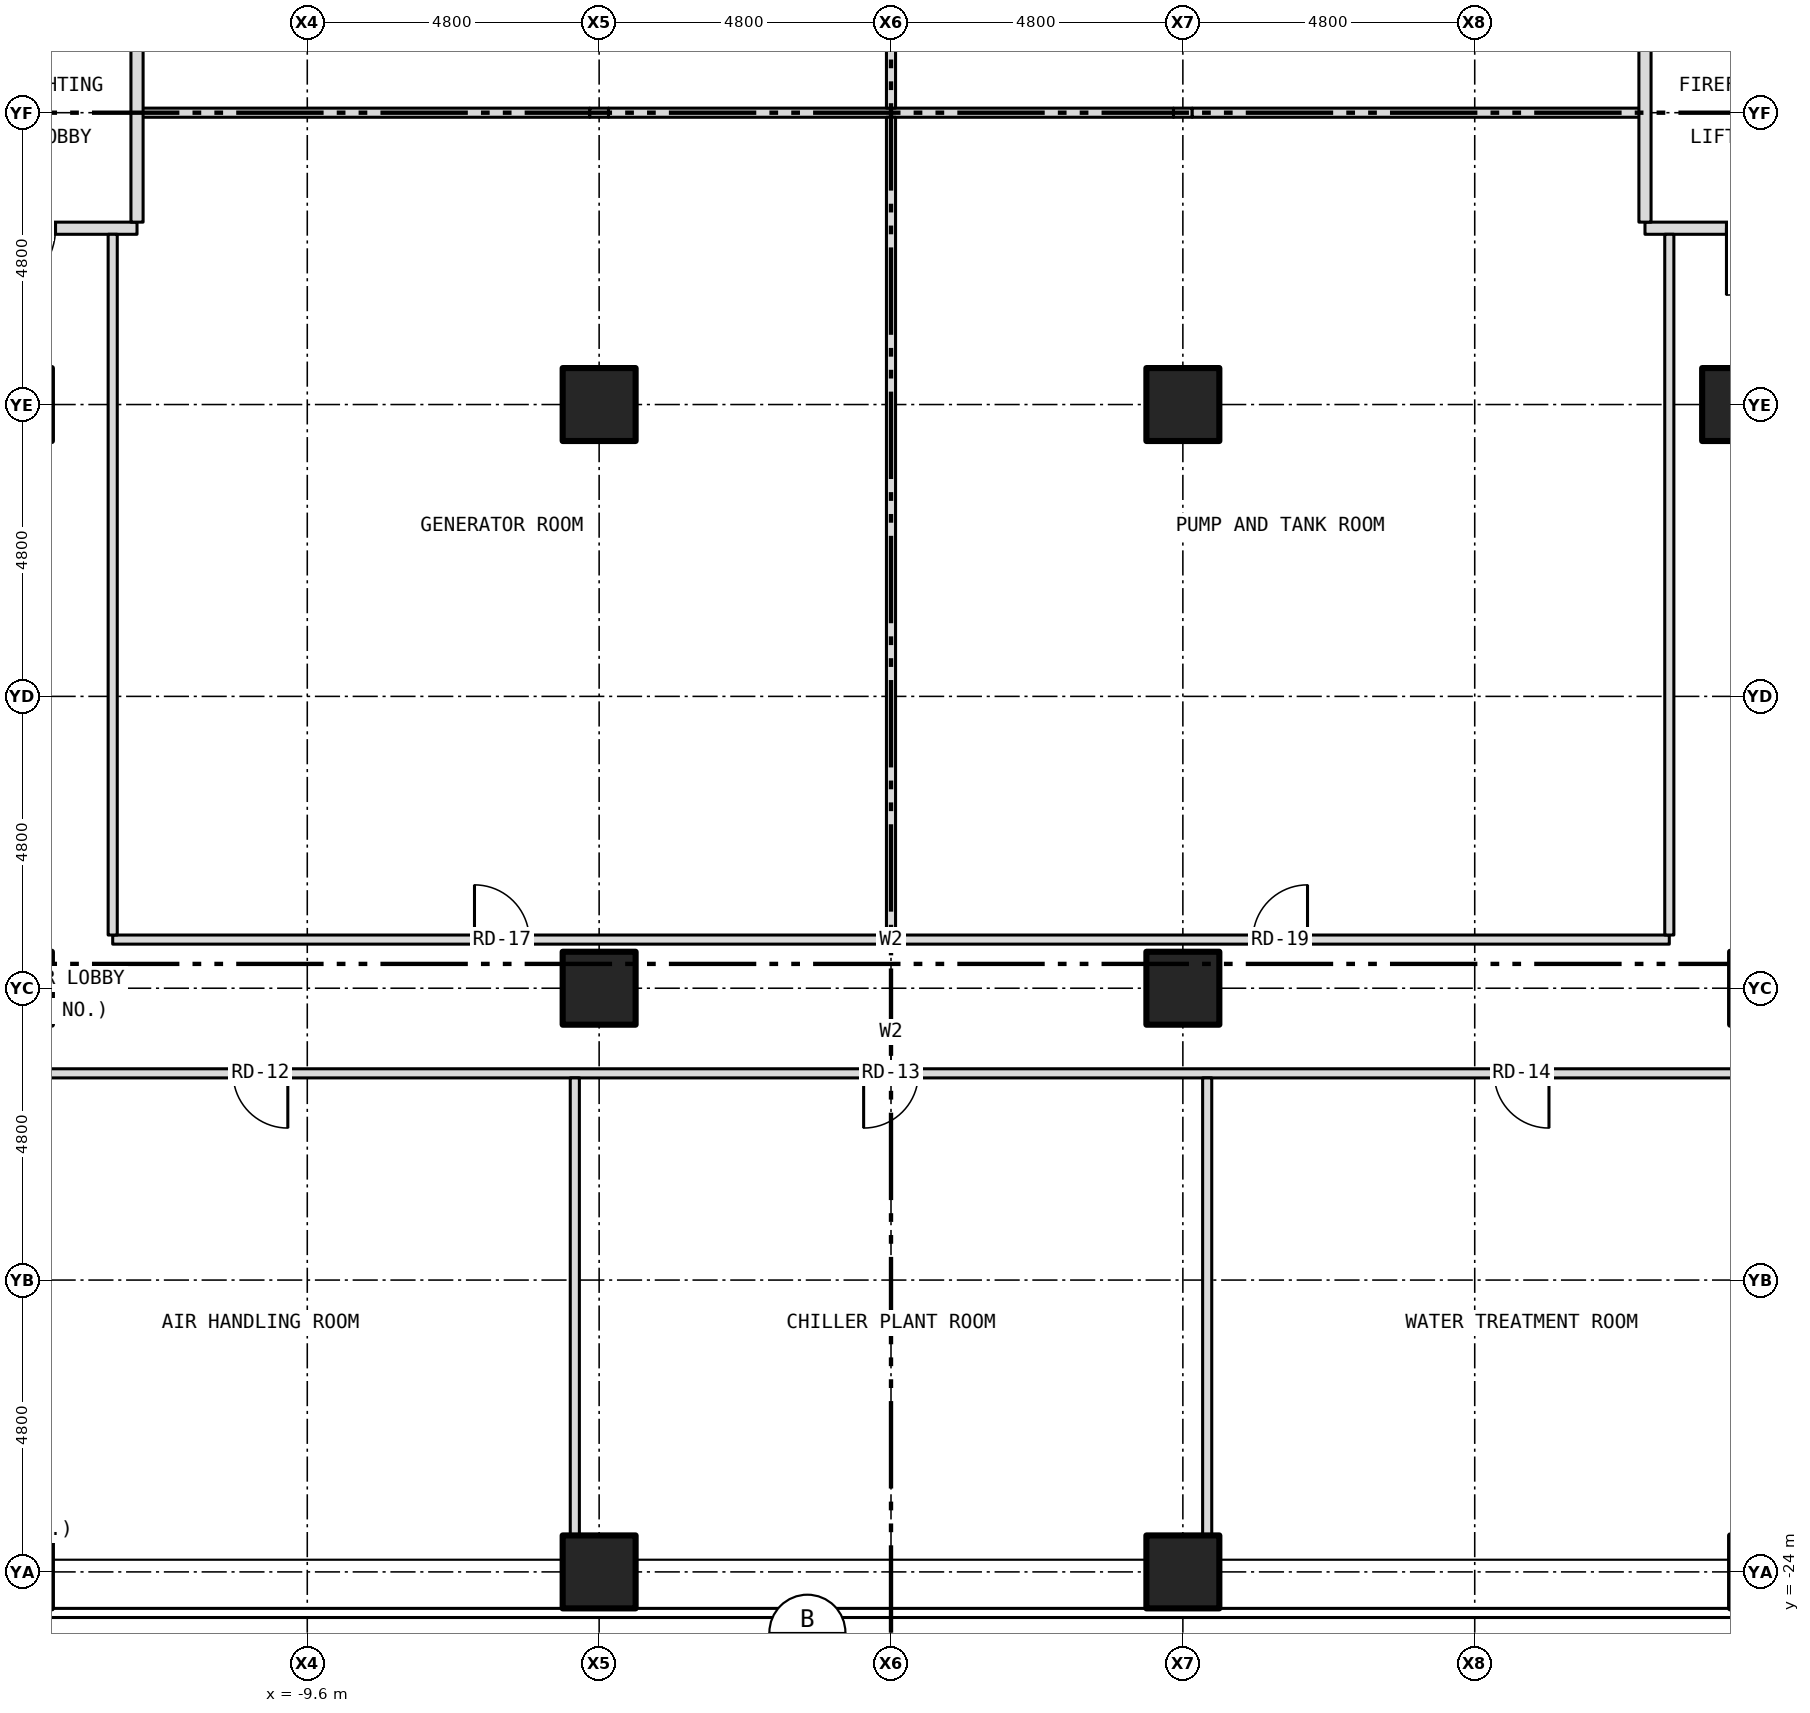
"""IFC4 building model, lengths in metres.
Left out: names, types, materials, properties, quantities, classifications, styles, units other than length and angle.
Written with IfcOpenShell. Run it as: python <this file> out.ifc"""

import sys

from ifc_helpers import new_model, si_unit, direction, frame, frame_2d, origin, origin_2d, place, context, subcontext, project, spatial, rectangle, hollow_rectangle, extrude, element, fill, save


model = new_model("IFC4")
c1 = context("Model", 3, precision=1e-05, world=origin(), true_north=direction((0.0, 1.0)))
c2 = subcontext(c1, "Body", "Model", "MODEL_VIEW")
j1 = project(units=[si_unit("LENGTHUNIT", "METRE"), si_unit("PLANEANGLEUNIT", "RADIAN")], contexts=[c1])
p1 = place(None, origin())
s1 = spatial("IfcSite", under=j1, at=p1, CompositionType="ELEMENT")
p2 = place(p1, origin())
s2 = spatial("IfcBuilding", under=s1, at=p2, CompositionType="ELEMENT")
p3 = place(p2, frame((0.0, 0.0, 33.5)))
s3 = spatial("IfcBuildingStorey", under=s2, at=p3, CompositionType="ELEMENT", Elevation=33.5)
for number, where, z_axis, x_axis in (
    (1, (-14.4, -24.0, -0.3), (0.0, 0.0, 1.0), (1.0, 0.0, 0.0)),
    (2, (-4.8, -24.0, -0.3), (0.0, 0.0, 1.0), (1.0, 0.0, 0.0)),
    (3, (4.8, -24.0, -0.3), (0.0, 0.0, 1.0), (1.0, 0.0, 0.0)),
    (4, (14.4, -24.0, -0.3), (0.0, 0.0, 1.0), (1.0, 0.0, 0.0)),
    (5, (-14.4, -14.4, -0.3), (0.0, 0.0, 1.0), (1.0, 0.0, 0.0)),
    (6, (-14.4, -4.8, -0.3), (0.0, 0.0, 1.0), (1.0, 0.0, 0.0)),
    (7, (-4.8, -14.4, -0.3), (0.0, 0.0, 1.0), (1.0, 0.0, 0.0)),
    (8, (-4.8, -4.8, -0.3), (0.0, 0.0, 1.0), (1.0, 0.0, 0.0)),
    (9, (4.8, -14.4, -0.3), (0.0, 0.0, 1.0), (1.0, 0.0, 0.0)),
    (10, (4.8, -4.8, -0.3), (0.0, 0.0, 1.0), (1.0, 0.0, 0.0)),
    (11, (14.4, -14.4, -0.3), (0.0, 0.0, 1.0), (1.0, 0.0, 0.0)),
    (12, (13.94, -4.8, -0.3), (0.0, 0.0, 1.0), (1.0, 0.0, 0.0)),
):
    element("IfcColumn", number, at=place(p3, frame(where, z_axis=z_axis, x_axis=x_axis)), inside=s3, PredefinedType="COLUMN", context=c2, shape_type="SweptSolid", body=[
        extrude(hollow_rectangle(XDim=1.2, YDim=1.2, WallThickness=0.07, at=origin_2d()), origin(), (0.0, 0.0, 1.0), 5.65),
    ])
p4 = place(p3, frame((-15.8, -15.8, 0.0), z_axis=(0.0, 0.0, 1.0), x_axis=(1.0, 0.0, 0.0)))
e13 = element("IfcWall", 13, at=p4, inside=s3, PredefinedType="PARTITIONING", context=c2, shape_type="SweptSolid", body=[
    extrude(rectangle(XDim=31.6, YDim=0.15, at=frame_2d((15.8, 0.0))), origin(), (0.0, 0.0, 1.0), 5.35),
])
p5 = place(p4, frame((4.98, 0.0, 0.0)))
e14 = element("IfcOpeningElement", 14, at=p5, cuts=e13, PredefinedType="OPENING", context=c2, shape_type="SweptSolid", body=[
    extrude(rectangle(XDim=0.9, YDim=2.1, at=frame_2d((0.45, 1.05))), frame((0.0, 0.087, 0.0), z_axis=(0.0, -1.0, 0.0), x_axis=(1.0, 0.0, 0.0)), (0.0, 0.0, 1.0), 0.174),
])
p6 = place(p4, frame((15.35, 0.0, 0.0)))
e15 = element("IfcOpeningElement", 15, at=p6, cuts=e13, PredefinedType="OPENING", context=c2, shape_type="SweptSolid", body=[
    extrude(rectangle(XDim=0.9, YDim=2.1, at=frame_2d((0.45, 1.05))), frame((0.0, 0.087, 0.0), z_axis=(0.0, -1.0, 0.0), x_axis=(1.0, 0.0, 0.0)), (0.0, 0.0, 1.0), 0.174),
])
p7 = place(p4, frame((25.721, 0.0, 0.0)))
e16 = element("IfcOpeningElement", 16, at=p7, cuts=e13, PredefinedType="OPENING", context=c2, shape_type="SweptSolid", body=[
    extrude(rectangle(XDim=0.9, YDim=2.1, at=frame_2d((0.45, 1.05))), frame((0.0, 0.087, 0.0), z_axis=(0.0, -1.0, 0.0), x_axis=(1.0, 0.0, 0.0)), (0.0, 0.0, 1.0), 0.174),
])
p8 = place(p3, frame((-12.8, -13.6, 0.0), z_axis=(0.0, 0.0, 1.0), x_axis=(1.0, 0.0, 0.0)))
e17 = element("IfcWall", 17, at=p8, inside=s3, PredefinedType="PARTITIONING", context=c2, shape_type="SweptSolid", body=[
    extrude(rectangle(XDim=25.6, YDim=0.15, at=frame_2d((12.8, 0.0))), origin(), (0.0, 0.0, 1.0), 5.35),
])
p9 = place(p8, frame((5.95, 0.0, 0.0)))
e18 = element("IfcOpeningElement", 18, at=p9, cuts=e17, PredefinedType="OPENING", context=c2, shape_type="SweptSolid", body=[
    extrude(rectangle(XDim=0.9, YDim=2.1, at=frame_2d((0.45, 1.05))), frame((0.0, 0.087, 0.0), z_axis=(0.0, -1.0, 0.0), x_axis=(1.0, 0.0, 0.0)), (0.0, 0.0, 1.0), 0.174),
])
p10 = place(p8, frame((18.75, 0.0, 0.0)))
e19 = element("IfcOpeningElement", 19, at=p10, cuts=e17, PredefinedType="OPENING", context=c2, shape_type="SweptSolid", body=[
    extrude(rectangle(XDim=0.9, YDim=2.1, at=frame_2d((0.45, 1.05))), frame((0.0, 0.087, 0.0), z_axis=(0.0, -1.0, 0.0), x_axis=(1.0, 0.0, 0.0)), (0.0, 0.0, 1.0), 0.174),
])
p11 = place(p3, frame((-15.68, -1.9, 0.0), z_axis=(0.0, 0.0, 1.0), x_axis=(1.0, 0.0, 0.0)))
e20 = element("IfcWall", 20, at=p11, inside=s3, PredefinedType="PARTITIONING", context=c2, shape_type="SweptSolid", body=[
    extrude(rectangle(XDim=3.28, YDim=0.2, at=frame_2d((1.64, 0.0))), origin(), (0.0, 0.0, 1.0), 5.35),
])
p12 = place(p11, frame((0.84, 0.0, 0.0)))
e21 = element("IfcOpeningElement", 21, at=p12, cuts=e20, PredefinedType="OPENING", context=c2, shape_type="SweptSolid", body=[
    extrude(rectangle(XDim=1.1, YDim=2.1, at=frame_2d((0.55, 1.05))), frame((0.0, 0.112, 0.0), z_axis=(0.0, -1.0, 0.0), x_axis=(1.0, 0.0, 0.0)), (0.0, 0.0, 1.0), 0.224),
])
p13 = place(p3, frame((12.4, -1.9, 0.0), z_axis=(0.0, 0.0, 1.0), x_axis=(1.0, 0.0, 0.0)))
e22 = element("IfcWall", 22, at=p13, inside=s3, PredefinedType="PARTITIONING", context=c2, shape_type="SweptSolid", body=[
    extrude(rectangle(XDim=3.28, YDim=0.2, at=frame_2d((1.64, 0.0))), origin(), (0.0, 0.0, 1.0), 5.35),
])
p14 = place(p13, frame((1.34, 0.0, 0.0)))
e23 = element("IfcOpeningElement", 23, at=p14, cuts=e22, PredefinedType="OPENING", context=c2, shape_type="SweptSolid", body=[
    extrude(rectangle(XDim=1.1, YDim=2.1, at=frame_2d((0.55, 1.05))), frame((0.0, 0.112, 0.0), z_axis=(0.0, -1.0, 0.0), x_axis=(1.0, 0.0, 0.0)), (0.0, 0.0, 1.0), 0.224),
])
p15 = place(p3, frame((-12.4, 0.0, 0.0), z_axis=(0.0, 0.0, 1.0), x_axis=(1.0, 0.0, 0.0)))
e24 = element("IfcWall", 24, at=p15, inside=s3, PredefinedType="PARTITIONING", context=c2, shape_type="SweptSolid", body=[
    extrude(rectangle(XDim=7.446, YDim=0.15, at=frame_2d((3.723, 0.0))), origin(), (0.0, 0.0, 1.0), 4.359),
])
p16 = place(p3, frame((-4.954, 0.0, 0.0), z_axis=(0.0, 0.0, 1.0), x_axis=(1.0, 0.0, 0.0)))
e25 = element("IfcWall", 25, at=p16, inside=s3, PredefinedType="PARTITIONING", context=c2, shape_type="SweptSolid", body=[
    extrude(rectangle(XDim=0.308, YDim=0.15, at=frame_2d((0.154, 0.0))), origin(), (0.0, 0.0, 1.0), 5.35),
])
p17 = place(p3, frame((-4.646, 0.0, 0.0), z_axis=(0.0, 0.0, 1.0), x_axis=(1.0, 0.0, 0.0)))
e26 = element("IfcWall", 26, at=p17, inside=s3, PredefinedType="PARTITIONING", context=c2, shape_type="SweptSolid", body=[
    extrude(rectangle(XDim=9.292, YDim=0.15, at=frame_2d((4.646, 0.0))), origin(), (0.0, 0.0, 1.0), 4.359),
])
p18 = place(p3, frame((4.646, 0.0, 0.0), z_axis=(0.0, 0.0, 1.0), x_axis=(1.0, 0.0, 0.0)))
e27 = element("IfcWall", 27, at=p18, inside=s3, PredefinedType="PARTITIONING", context=c2, shape_type="SweptSolid", body=[
    extrude(rectangle(XDim=0.308, YDim=0.15, at=frame_2d((0.154, 0.0))), origin(), (0.0, 0.0, 1.0), 5.35),
])
p19 = place(p3, frame((4.954, 0.0, 0.0), z_axis=(0.0, 0.0, 1.0), x_axis=(1.0, 0.0, 0.0)))
e28 = element("IfcWall", 28, at=p19, inside=s3, PredefinedType="PARTITIONING", context=c2, shape_type="SweptSolid", body=[
    extrude(rectangle(XDim=7.446, YDim=0.15, at=frame_2d((3.723, 0.0))), origin(), (0.0, 0.0, 1.0), 4.359),
])
p20 = place(p3, frame((-12.8, -13.525, 0.0), z_axis=(0.0, 0.0, 1.0), x_axis=(0.0, 1.0, 0.0)))
e29 = element("IfcWall", 29, at=p20, inside=s3, PredefinedType="PARTITIONING", context=c2, shape_type="SweptSolid", body=[
    extrude(rectangle(XDim=11.525, YDim=0.15, at=frame_2d((5.762, 0.0))), origin(), (0.0, 0.0, 1.0), 5.35),
])
p21 = place(p3, frame((-12.4, -1.8, 0.0), z_axis=(0.0, 0.0, 1.0), x_axis=(0.0, 1.0, 0.0)))
e30 = element("IfcWall", 30, at=p21, inside=s3, PredefinedType="PARTITIONING", context=c2, shape_type="SweptSolid", body=[
    extrude(rectangle(XDim=4.0, YDim=0.2, at=frame_2d((2.0, 0.0))), origin(), (0.0, 0.0, 1.0), 5.35),
])
p22 = place(p3, frame((-5.2, -23.88, 0.0), z_axis=(0.0, 0.0, 1.0), x_axis=(0.0, 1.0, 0.0)))
e31 = element("IfcWall", 31, at=p22, inside=s3, PredefinedType="PARTITIONING", context=c2, shape_type="SweptSolid", body=[
    extrude(rectangle(XDim=8.005, YDim=0.15, at=frame_2d((4.002, 0.0))), origin(), (0.0, 0.0, 1.0), 5.35),
])
for number, where, z_axis, x_axis in (
    (32, (0.0, -13.525, 0.0), (0.0, 0.0, 1.0), (0.0, 1.0, 0.0)),
    (33, (0.0, 0.075, 0.0), (0.0, 0.0, 1.0), (0.0, 1.0, 0.0)),
):
    element("IfcWall", number, at=place(p3, frame(where, z_axis=z_axis, x_axis=x_axis)), inside=s3, PredefinedType="PARTITIONING", context=c2, shape_type="SweptSolid", body=[
        extrude(rectangle(XDim=13.45, YDim=0.15, at=frame_2d((6.725, 0.0))), origin(), (0.0, 0.0, 1.0), 5.35),
    ])
p23 = place(p3, frame((5.2, -23.88, 0.0), z_axis=(0.0, 0.0, 1.0), x_axis=(0.0, 1.0, 0.0)))
e34 = element("IfcWall", 34, at=p23, inside=s3, PredefinedType="PARTITIONING", context=c2, shape_type="SweptSolid", body=[
    extrude(rectangle(XDim=8.005, YDim=0.15, at=frame_2d((4.002, 0.0))), origin(), (0.0, 0.0, 1.0), 5.35),
])
p24 = place(p3, frame((12.4, -1.8, 0.0), z_axis=(0.0, 0.0, 1.0), x_axis=(0.0, 1.0, 0.0)))
e35 = element("IfcWall", 35, at=p24, inside=s3, PredefinedType="PARTITIONING", context=c2, shape_type="SweptSolid", body=[
    extrude(rectangle(XDim=4.0, YDim=0.2, at=frame_2d((2.0, 0.0))), origin(), (0.0, 0.0, 1.0), 5.35),
])
p25 = place(p3, frame((12.8, -13.525, 0.0), z_axis=(0.0, 0.0, 1.0), x_axis=(0.0, 1.0, 0.0)))
e36 = element("IfcWall", 36, at=p25, inside=s3, PredefinedType="PARTITIONING", context=c2, shape_type="SweptSolid", body=[
    extrude(rectangle(XDim=11.525, YDim=0.15, at=frame_2d((5.762, 0.0))), origin(), (0.0, 0.0, 1.0), 5.35),
])
p26 = place(p12, origin())
e37 = element("IfcDoor", 37, at=p26, inside=s3, OperationType="SINGLE_SWING_LEFT", PredefinedType="DOOR", context=c2, shape_type="SweptSolid", body=[
    extrude(rectangle(XDim=1.1, YDim=2.1, at=frame_2d((0.55, 1.05))), frame((0.0, 0.025, 0.0), z_axis=(0.0, -1.0, 0.0), x_axis=(1.0, 0.0, 0.0)), (0.0, 0.0, 1.0), 0.05),
])
fill(e21, e37)
p27 = place(p14, origin())
e38 = element("IfcDoor", 38, at=p27, inside=s3, OperationType="SINGLE_SWING_LEFT", PredefinedType="DOOR", context=c2, shape_type="SweptSolid", body=[
    extrude(rectangle(XDim=1.1, YDim=2.1, at=frame_2d((0.55, 1.05))), frame((0.0, 0.025, 0.0), z_axis=(0.0, -1.0, 0.0), x_axis=(1.0, 0.0, 0.0)), (0.0, 0.0, 1.0), 0.05),
])
fill(e23, e38)
p28 = place(p5, origin())
e39 = element("IfcDoor", 39, at=p28, inside=s3, OperationType="SINGLE_SWING_RIGHT", PredefinedType="DOOR", context=c2, shape_type="SweptSolid", body=[
    extrude(rectangle(XDim=0.9, YDim=2.1, at=frame_2d((0.45, 1.05))), frame((0.0, 0.025, 0.0), z_axis=(0.0, -1.0, 0.0), x_axis=(1.0, 0.0, 0.0)), (0.0, 0.0, 1.0), 0.05),
])
fill(e14, e39)
p29 = place(p6, origin())
e40 = element("IfcDoor", 40, at=p29, inside=s3, OperationType="SINGLE_SWING_LEFT", PredefinedType="DOOR", context=c2, shape_type="SweptSolid", body=[
    extrude(rectangle(XDim=0.9, YDim=2.1, at=frame_2d((0.45, 1.05))), frame((0.0, 0.025, 0.0), z_axis=(0.0, -1.0, 0.0), x_axis=(1.0, 0.0, 0.0)), (0.0, 0.0, 1.0), 0.05),
])
fill(e15, e40)
p30 = place(p7, origin())
e41 = element("IfcDoor", 41, at=p30, inside=s3, OperationType="SINGLE_SWING_RIGHT", PredefinedType="DOOR", context=c2, shape_type="SweptSolid", body=[
    extrude(rectangle(XDim=0.9, YDim=2.1, at=frame_2d((0.45, 1.05))), frame((0.0, 0.025, 0.0), z_axis=(0.0, -1.0, 0.0), x_axis=(1.0, 0.0, 0.0)), (0.0, 0.0, 1.0), 0.05),
])
fill(e16, e41)
p31 = place(p9, origin())
e42 = element("IfcDoor", 42, at=p31, inside=s3, OperationType="SINGLE_SWING_LEFT", PredefinedType="DOOR", context=c2, shape_type="SweptSolid", body=[
    extrude(rectangle(XDim=0.9, YDim=2.1, at=frame_2d((0.45, 1.05))), frame((0.0, 0.025, 0.0), z_axis=(0.0, -1.0, 0.0), x_axis=(1.0, 0.0, 0.0)), (0.0, 0.0, 1.0), 0.05),
])
fill(e18, e42)
p32 = place(p10, origin())
e43 = element("IfcDoor", 43, at=p32, inside=s3, OperationType="SINGLE_SWING_RIGHT", PredefinedType="DOOR", context=c2, shape_type="SweptSolid", body=[
    extrude(rectangle(XDim=0.9, YDim=2.1, at=frame_2d((0.45, 1.05))), frame((0.0, 0.025, 0.0), z_axis=(0.0, -1.0, 0.0), x_axis=(1.0, 0.0, 0.0)), (0.0, 0.0, 1.0), 0.05),
])
fill(e19, e43)
save(model, sys.argv[1])
